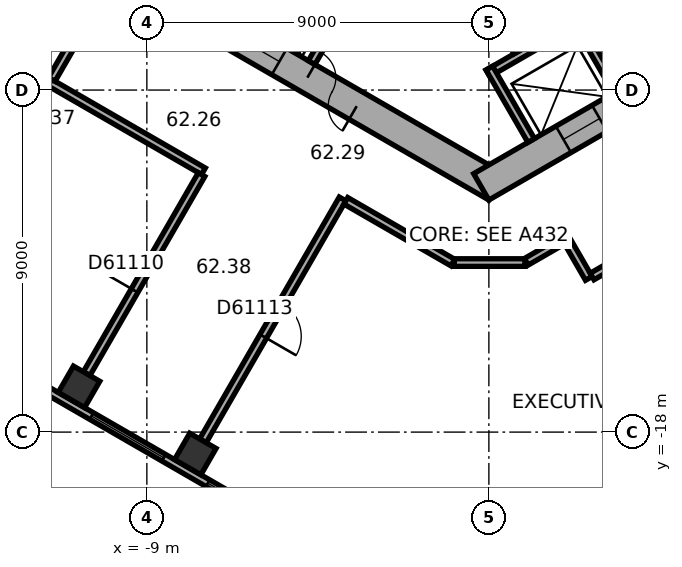
"""IFC4 building model, lengths in metres.
Left out: names, types, materials, properties, quantities, classifications, styles, units other than length and angle.
Written with IfcOpenShell. Run it as: python <this file> out.ifc"""

import sys

from ifc_helpers import new_model, si_unit, direction, frame, frame_2d, origin, origin_2d, place, context, subcontext, project, spatial, rectangle, extrude, element, fill, save


model = new_model("IFC4")
c1 = context("Model", 3, precision=1e-05, world=origin(), true_north=direction((0.0, 1.0)))
c2 = subcontext(c1, "Body", "Model", "MODEL_VIEW")
j1 = project(units=[si_unit("LENGTHUNIT", "METRE"), si_unit("PLANEANGLEUNIT", "RADIAN")], contexts=[c1])
p1 = place(None, origin())
s1 = spatial("IfcSite", under=j1, at=p1, CompositionType="ELEMENT")
p2 = place(p1, origin())
s2 = spatial("IfcBuilding", under=s1, at=p2, CompositionType="ELEMENT")
p3 = place(p2, frame((0.0, 0.0, 251.3)))
s3 = spatial("IfcBuildingStorey", under=s2, at=p3, CompositionType="ELEMENT", Elevation=251.3)
for number, where, z_axis, x_axis in (
    (1, (-10.785, -16.809, 0.0), (0.0, 0.0, 1.0), (0.866, -0.5, 0.0)),
    (2, (-7.725, -18.576, 0.0), (0.0, 0.0, 1.0), (0.866, -0.5, 0.0)),
):
    element("IfcColumn", number, at=place(p3, frame(where, z_axis=z_axis, x_axis=x_axis)), inside=s3, PredefinedType="COLUMN", context=c2, shape_type="SweptSolid", body=[
        extrude(rectangle(XDim=0.8, YDim=0.8, at=origin_2d()), origin(), (0.0, 0.0, 1.0), 3.7),
    ])
p4 = place(p3, frame((-10.1, -5.6, 0.0), z_axis=(0.0, 0.0, 1.0), x_axis=(0.866023897231, -0.500002609418, 0.0)))
e3 = element("IfcWall", 3, at=p4, inside=s3, PredefinedType="SHEAR", context=c2, shape_type="SweptSolid", body=[
    extrude(rectangle(XDim=11.894, YDim=0.8, at=frame_2d((5.947, 0.0))), origin(), (0.0, 0.0, 1.0), 3.7),
])
p5 = place(p4, frame((6.147, 0.0, 0.0)))
e4 = element("IfcOpeningElement", 4, at=p5, cuts=e3, PredefinedType="OPENING", context=c2, shape_type="SweptSolid", body=[
    extrude(rectangle(XDim=1.5, YDim=2.1, at=frame_2d((0.75, 1.05))), frame((0.0, 0.41, 0.0), z_axis=(0.0, -1.0, 0.0), x_axis=(1.0, 0.0, 0.0)), (0.0, 0.0, 1.0), 0.82),
])
p6 = place(p4, frame((1.597, 0.0, 0.0)))
e5 = element("IfcOpeningElement", 5, at=p6, cuts=e3, PredefinedType="OPENING", context=c2, shape_type="SweptSolid", body=[
    extrude(rectangle(XDim=1.1, YDim=2.1, at=frame_2d((0.55, 1.05))), frame((0.0, 0.41, 0.0), z_axis=(0.0, -1.0, 0.0), x_axis=(1.0, 0.0, 0.0)), (0.0, 0.0, 1.0), 0.82),
])
p7 = place(p4, frame((4.197, 0.0, 0.0)))
e6 = element("IfcOpeningElement", 6, at=p7, cuts=e3, PredefinedType="OPENING", context=c2, shape_type="SweptSolid", body=[
    extrude(rectangle(XDim=1.1, YDim=2.1, at=frame_2d((0.55, 1.05))), frame((0.0, 0.41, 0.0), z_axis=(0.0, -1.0, 0.0), x_axis=(1.0, 0.0, 0.0)), (0.0, 0.0, 1.0), 0.82),
])
p8 = place(p3, frame((-0.2, -11.547, 0.0), z_axis=(0.0, 0.0, 1.0), x_axis=(0.866023897231, 0.500002609418, 0.0)))
e7 = element("IfcWall", 7, at=p8, inside=s3, PredefinedType="SHEAR", context=c2, shape_type="SweptSolid", body=[
    extrude(rectangle(XDim=11.894, YDim=0.8, at=frame_2d((5.947, 0.0))), origin(), (0.0, 0.0, 1.0), 3.7),
])
p9 = place(p8, frame((2.497, 0.0, 0.0)))
e8 = element("IfcOpeningElement", 8, at=p9, cuts=e7, PredefinedType="OPENING", context=c2, shape_type="SweptSolid", body=[
    extrude(rectangle(XDim=1.1, YDim=2.1, at=frame_2d((0.55, 1.05))), frame((0.0, 0.41, 0.0), z_axis=(0.0, -1.0, 0.0), x_axis=(1.0, 0.0, 0.0)), (0.0, 0.0, 1.0), 0.82),
])
p10 = place(p8, frame((5.097, 0.0, 0.0)))
e9 = element("IfcOpeningElement", 9, at=p10, cuts=e7, PredefinedType="OPENING", context=c2, shape_type="SweptSolid", body=[
    extrude(rectangle(XDim=1.1, YDim=2.1, at=frame_2d((0.55, 1.05))), frame((0.0, 0.41, 0.0), z_axis=(0.0, -1.0, 0.0), x_axis=(1.0, 0.0, 0.0)), (0.0, 0.0, 1.0), 0.82),
])
p11 = place(p8, frame((7.697, 0.0, 0.0)))
e10 = element("IfcOpeningElement", 10, at=p11, cuts=e7, PredefinedType="OPENING", context=c2, shape_type="SweptSolid", body=[
    extrude(rectangle(XDim=1.1, YDim=2.1, at=frame_2d((0.55, 1.05))), frame((0.0, 0.41, 0.0), z_axis=(0.0, -1.0, 0.0), x_axis=(1.0, 0.0, 0.0)), (0.0, 0.0, 1.0), 0.82),
])
p12 = place(p3, frame((-17.664, -13.415, 0.0), z_axis=(0.0, 0.0, 1.0), x_axis=(0.866026555358, -0.49999800541, 0.0)))
e11 = element("IfcWall", 11, at=p12, inside=s3, PredefinedType="STANDARD", context=c2, shape_type="SweptSolid", body=[
    extrude(rectangle(XDim=18.841, YDim=0.2, at=frame_2d((9.421, 0.0))), origin(), (0.0, 0.0, 1.0), 3.7),
])
p13 = place(p12, frame((1.254, 0.0, 0.9)))
e12 = element("IfcOpeningElement", 12, at=p13, cuts=e11, PredefinedType="OPENING", context=c2, shape_type="SweptSolid", body=[
    extrude(rectangle(XDim=2.2, YDim=2.0, at=frame_2d((1.1, 1.0))), frame((0.0, 0.11, 0.0), z_axis=(0.0, -1.0, 0.0), x_axis=(1.0, 0.0, 0.0)), (0.0, 0.0, 1.0), 0.22),
])
p14 = place(p12, frame((4.788, 0.0, 0.9)))
e13 = element("IfcOpeningElement", 13, at=p14, cuts=e11, PredefinedType="OPENING", context=c2, shape_type="SweptSolid", body=[
    extrude(rectangle(XDim=2.2, YDim=2.0, at=frame_2d((1.1, 1.0))), frame((0.0, 0.11, 0.0), z_axis=(0.0, -1.0, 0.0), x_axis=(1.0, 0.0, 0.0)), (0.0, 0.0, 1.0), 0.22),
])
p15 = place(p12, frame((8.322, 0.0, 0.9)))
e14 = element("IfcOpeningElement", 14, at=p15, cuts=e11, PredefinedType="OPENING", context=c2, shape_type="SweptSolid", body=[
    extrude(rectangle(XDim=2.2, YDim=2.0, at=frame_2d((1.1, 1.0))), frame((0.0, 0.11, 0.0), z_axis=(0.0, -1.0, 0.0), x_axis=(1.0, 0.0, 0.0)), (0.0, 0.0, 1.0), 0.22),
])
p16 = place(p12, frame((11.855, 0.0, 0.9)))
e15 = element("IfcOpeningElement", 15, at=p16, cuts=e11, PredefinedType="OPENING", context=c2, shape_type="SweptSolid", body=[
    extrude(rectangle(XDim=2.2, YDim=2.0, at=frame_2d((1.1, 1.0))), frame((0.0, 0.11, 0.0), z_axis=(0.0, -1.0, 0.0), x_axis=(1.0, 0.0, 0.0)), (0.0, 0.0, 1.0), 0.22),
])
p17 = place(p12, frame((15.389, 0.0, 0.9)))
e16 = element("IfcOpeningElement", 16, at=p17, cuts=e11, PredefinedType="OPENING", context=c2, shape_type="SweptSolid", body=[
    extrude(rectangle(XDim=2.2, YDim=2.0, at=frame_2d((1.1, 1.0))), frame((0.0, 0.11, 0.0), z_axis=(0.0, -1.0, 0.0), x_axis=(1.0, 0.0, 0.0)), (0.0, 0.0, 1.0), 0.22),
])
p18 = place(p3, frame((2.739, -22.711, 0.0), z_axis=(0.0, 0.0, 1.0), x_axis=(0.833885723098, 0.551937134838, 0.0)))
e17 = element("IfcWall", 17, at=p18, inside=s3, PredefinedType="STANDARD", context=c2, shape_type="SweptSolid", body=[
    extrude(rectangle(XDim=18.841, YDim=0.2, at=frame_2d((9.421, 0.0))), origin(), (0.0, 0.0, 1.0), 3.7),
])
p19 = place(p18, frame((1.252, 0.0, 0.9)))
e18 = element("IfcOpeningElement", 18, at=p19, cuts=e17, PredefinedType="OPENING", context=c2, shape_type="SweptSolid", body=[
    extrude(rectangle(XDim=2.2, YDim=2.0, at=frame_2d((1.1, 1.0))), frame((0.0, 0.11, 0.0), z_axis=(0.0, -1.0, 0.0), x_axis=(1.0, 0.0, 0.0)), (0.0, 0.0, 1.0), 0.22),
])
p20 = place(p18, frame((4.786, 0.0, 0.9)))
e19 = element("IfcOpeningElement", 19, at=p20, cuts=e17, PredefinedType="OPENING", context=c2, shape_type="SweptSolid", body=[
    extrude(rectangle(XDim=2.2, YDim=2.0, at=frame_2d((1.1, 1.0))), frame((0.0, 0.11, 0.0), z_axis=(0.0, -1.0, 0.0), x_axis=(1.0, 0.0, 0.0)), (0.0, 0.0, 1.0), 0.22),
])
p21 = place(p18, frame((8.32, 0.0, 0.9)))
e20 = element("IfcOpeningElement", 20, at=p21, cuts=e17, PredefinedType="OPENING", context=c2, shape_type="SweptSolid", body=[
    extrude(rectangle(XDim=2.2, YDim=2.0, at=frame_2d((1.1, 1.0))), frame((0.0, 0.11, 0.0), z_axis=(0.0, -1.0, 0.0), x_axis=(1.0, 0.0, 0.0)), (0.0, 0.0, 1.0), 0.22),
])
p22 = place(p18, frame((11.854, 0.0, 0.9)))
e21 = element("IfcOpeningElement", 21, at=p22, cuts=e17, PredefinedType="OPENING", context=c2, shape_type="SweptSolid", body=[
    extrude(rectangle(XDim=2.2, YDim=2.0, at=frame_2d((1.1, 1.0))), frame((0.0, 0.11, 0.0), z_axis=(0.0, -1.0, 0.0), x_axis=(1.0, 0.0, 0.0)), (0.0, 0.0, 1.0), 0.22),
])
p23 = place(p18, frame((15.387, 0.0, 0.9)))
e22 = element("IfcOpeningElement", 22, at=p23, cuts=e17, PredefinedType="OPENING", context=c2, shape_type="SweptSolid", body=[
    extrude(rectangle(XDim=2.2, YDim=2.0, at=frame_2d((1.1, 1.0))), frame((0.0, 0.11, 0.0), z_axis=(0.0, -1.0, 0.0), x_axis=(1.0, 0.0, 0.0)), (0.0, 0.0, 1.0), 0.22),
])
p24 = place(p3, frame((-3.563, -6.372, 0.0), z_axis=(0.0, 0.0, 1.0), x_axis=(-0.499994660107, -0.866028486751, 0.0)))
e23 = element("IfcWall", 23, at=p24, inside=s3, PredefinedType="PARTITIONING", context=c2, shape_type="SweptSolid", body=[
    extrude(rectangle(XDim=2.2, YDim=0.2, at=frame_2d((1.1, 0.0))), origin(), (0.0, 0.0, 1.0), 3.35),
])
p25 = place(p3, frame((-0.024, -8.559, 0.0), z_axis=(0.0, 0.0, 1.0), x_axis=(0.866026010844, 0.49999894854, 0.0)))
e24 = element("IfcWall", 24, at=p25, inside=s3, PredefinedType="PARTITIONING", context=c2, shape_type="SweptSolid", body=[
    extrude(rectangle(XDim=8.0, YDim=0.2, at=frame_2d((4.0, 0.0))), origin(), (0.0, 0.0, 1.0), 3.35),
])
for number, where, z_axis, x_axis in (
    (25, (0.013, -8.422, 0.0), (0.0, 0.0, 1.0), (0.5, -0.866, 0.0)),
    (26, (2.264, -7.122, 0.0), (0.0, 0.0, 1.0), (0.5, -0.866, 0.0)),
):
    element("IfcWall", number, at=place(p3, frame(where, z_axis=z_axis, x_axis=x_axis)), inside=s3, PredefinedType="PARTITIONING", context=c2, shape_type="SweptSolid", body=[
        extrude(rectangle(XDim=2.2, YDim=0.2, at=frame_2d((1.1, 0.0))), origin(), (0.0, 0.0, 1.0), 3.35),
    ])
p26 = place(p3, frame((-1.558, -3.902, 0.0), z_axis=(0.0, 0.0, 1.0), x_axis=(0.499977259774, -0.866038532462, 0.0)))
e27 = element("IfcWall", 27, at=p26, inside=s3, PredefinedType="SHEAR", context=c2, shape_type="SweptSolid", body=[
    extrude(rectangle(XDim=4.7, YDim=0.3, at=frame_2d((2.35, 0.0))), origin(), (0.0, 0.0, 1.0), 3.35),
])
p27 = place(p26, frame((0.8, 0.0, 0.0)))
e28 = element("IfcOpeningElement", 28, at=p27, cuts=e27, PredefinedType="OPENING", context=c2, shape_type="SweptSolid", body=[
    extrude(rectangle(XDim=1.2, YDim=2.1, at=frame_2d((0.6, 1.05))), frame((0.0, 0.16, 0.0), z_axis=(0.0, -1.0, 0.0), x_axis=(1.0, 0.0, 0.0)), (0.0, 0.0, 1.0), 0.32),
])
p28 = place(p3, frame((-11.551, -8.805, 0.0), z_axis=(0.0, 0.0, 1.0), x_axis=(0.866038310922, -0.499977643516, 0.0)))
e29 = element("IfcWall", 29, at=p28, inside=s3, PredefinedType="PARTITIONING", context=c2, shape_type="SweptSolid", body=[
    extrude(rectangle(XDim=4.665, YDim=0.2, at=frame_2d((2.333, 0.0))), origin(), (0.0, 0.0, 1.0), 3.35),
])
p29 = place(p3, frame((-10.951, -7.765, 0.0), z_axis=(0.0, 0.0, 1.0), x_axis=(-0.499978356969, -0.866037899034, 0.0)))
e30 = element("IfcWall", 30, at=p29, inside=s3, PredefinedType="PARTITIONING", context=c2, shape_type="SweptSolid", body=[
    extrude(rectangle(XDim=1.101, YDim=0.2, at=frame_2d((0.551, 0.0))), origin(), (0.0, 0.0, 1.0), 3.35),
])
p30 = place(p3, frame((-10.585, -16.463, 0.0), z_axis=(0.0, 0.0, 1.0), x_axis=(0.499993802756, 0.866028981735, 0.0)))
e31 = element("IfcWall", 31, at=p30, inside=s3, PredefinedType="PARTITIONING", context=c2, shape_type="SweptSolid", body=[
    extrude(rectangle(XDim=6.049, YDim=0.2, at=frame_2d((3.024, 0.0))), origin(), (0.0, 0.0, 1.0), 2.65),
])
p31 = place(p30, frame((2.524, 0.0, 0.0)))
e32 = element("IfcOpeningElement", 32, at=p31, cuts=e31, PredefinedType="OPENING", context=c2, shape_type="SweptSolid", body=[
    extrude(rectangle(XDim=1.0, YDim=2.1, at=frame_2d((0.5, 1.05))), frame((0.0, 0.11, 0.0), z_axis=(0.0, -1.0, 0.0), x_axis=(1.0, 0.0, 0.0)), (0.0, 0.0, 1.0), 0.22),
])
p32 = place(p3, frame((-7.525, -18.23, 0.0), z_axis=(0.0, 0.0, 1.0), x_axis=(0.499983153418, 0.866035129944, 0.0)))
e33 = element("IfcWall", 33, at=p32, inside=s3, PredefinedType="PARTITIONING", context=c2, shape_type="SweptSolid", body=[
    extrude(rectangle(XDim=7.35, YDim=0.2, at=frame_2d((3.675, 0.0))), origin(), (0.0, 0.0, 1.0), 3.35),
])
p33 = place(p32, frame((3.175, 0.0, 0.0)))
e34 = element("IfcOpeningElement", 34, at=p33, cuts=e33, PredefinedType="OPENING", context=c2, shape_type="SweptSolid", body=[
    extrude(rectangle(XDim=1.0, YDim=2.1, at=frame_2d((0.5, 1.05))), frame((0.0, 0.11, 0.0), z_axis=(0.0, -1.0, 0.0), x_axis=(1.0, 0.0, 0.0)), (0.0, 0.0, 1.0), 0.22),
])
p34 = place(p3, frame((-3.763, -11.915, 0.0), z_axis=(0.0, 0.0, 1.0), x_axis=(0.866037915695, -0.499978328108, 0.0)))
e35 = element("IfcWall", 35, at=p34, inside=s3, PredefinedType="PARTITIONING", context=c2, shape_type="SweptSolid", body=[
    extrude(rectangle(XDim=3.249, YDim=0.2, at=frame_2d((1.625, 0.0))), origin(), (0.0, 0.0, 1.0), 3.35),
])
p35 = place(p3, frame((-0.91, -13.539, 0.0), z_axis=(0.0, 0.0, 1.0), x_axis=(1.0, 0.0, 0.0)))
e36 = element("IfcWall", 36, at=p35, inside=s3, PredefinedType="PARTITIONING", context=c2, shape_type="SweptSolid", body=[
    extrude(rectangle(XDim=1.86, YDim=0.2, at=frame_2d((0.93, 0.0))), origin(), (0.0, 0.0, 1.0), 3.35),
])
p36 = place(p3, frame((0.985, -13.519, 0.0), z_axis=(0.0, 0.0, 1.0), x_axis=(0.866054082991, 0.499950322867, 0.0)))
e37 = element("IfcWall", 37, at=p36, inside=s3, PredefinedType="PARTITIONING", context=c2, shape_type="SweptSolid", body=[
    extrude(rectangle(XDim=1.206, YDim=0.2, at=frame_2d((0.603, 0.0))), origin(), (0.0, 0.0, 1.0), 3.35),
])
p37 = place(p3, frame((2.079, -13.003, 0.0), z_axis=(0.0, 0.0, 1.0), x_axis=(0.500074377092, -0.865982457891, 0.0)))
e38 = element("IfcWall", 38, at=p37, inside=s3, PredefinedType="PARTITIONING", context=c2, shape_type="SweptSolid", body=[
    extrude(rectangle(XDim=1.101, YDim=0.2, at=frame_2d((0.55, 0.0))), origin(), (0.0, 0.0, 1.0), 3.35),
])
p38 = place(p3, frame((2.716, -13.906, 0.0), z_axis=(0.0, 0.0, 1.0), x_axis=(0.866048512801, 0.499959971872, 0.0)))
e39 = element("IfcWall", 39, at=p38, inside=s3, PredefinedType="PARTITIONING", context=c2, shape_type="SweptSolid", body=[
    extrude(rectangle(XDim=2.818, YDim=0.2, at=frame_2d((1.409, 0.0))), origin(), (0.0, 0.0, 1.0), 3.35),
])
p39 = place(p15, origin())
e40 = element("IfcWindow", 40, at=p39, inside=s3, PartitioningType="SINGLE_PANEL", PredefinedType="WINDOW", context=c2, shape_type="SweptSolid", body=[
    extrude(rectangle(XDim=2.2, YDim=2.0, at=frame_2d((1.1, 1.0))), frame((0.0, 0.03, 0.0), z_axis=(0.0, -1.0, 0.0), x_axis=(1.0, 0.0, 0.0)), (0.0, 0.0, 1.0), 0.06),
])
fill(e14, e40)
p40 = place(p16, origin())
e41 = element("IfcWindow", 41, at=p40, inside=s3, PartitioningType="SINGLE_PANEL", PredefinedType="WINDOW", context=c2, shape_type="SweptSolid", body=[
    extrude(rectangle(XDim=2.2, YDim=2.0, at=frame_2d((1.1, 1.0))), frame((0.0, 0.03, 0.0), z_axis=(0.0, -1.0, 0.0), x_axis=(1.0, 0.0, 0.0)), (0.0, 0.0, 1.0), 0.06),
])
fill(e15, e41)
p41 = place(p5, origin())
e42 = element("IfcDoor", 42, at=p41, inside=s3, OperationType="DOUBLE_DOOR_SINGLE_SWING", PredefinedType="DOOR", context=c2, shape_type="SweptSolid", body=[
    extrude(rectangle(XDim=1.5, YDim=2.1, at=frame_2d((0.75, 1.05))), frame((0.0, 0.025, 0.0), z_axis=(0.0, -1.0, 0.0), x_axis=(1.0, 0.0, 0.0)), (0.0, 0.0, 1.0), 0.05),
])
fill(e4, e42)
p42 = place(p7, origin())
e43 = element("IfcDoor", 43, at=p42, inside=s3, OperationType="DOUBLE_DOOR_SLIDING", PredefinedType="DOOR", context=c2, shape_type="SweptSolid", body=[
    extrude(rectangle(XDim=1.1, YDim=2.1, at=frame_2d((0.55, 1.05))), frame((0.0, 0.025, 0.0), z_axis=(0.0, -1.0, 0.0), x_axis=(1.0, 0.0, 0.0)), (0.0, 0.0, 1.0), 0.05),
])
fill(e6, e43)
p43 = place(p9, origin())
e44 = element("IfcDoor", 44, at=p43, inside=s3, OperationType="DOUBLE_DOOR_SLIDING", PredefinedType="DOOR", context=c2, shape_type="SweptSolid", body=[
    extrude(rectangle(XDim=1.1, YDim=2.1, at=frame_2d((0.55, 1.05))), frame((0.0, 0.025, 0.0), z_axis=(0.0, -1.0, 0.0), x_axis=(1.0, 0.0, 0.0)), (0.0, 0.0, 1.0), 0.05),
])
fill(e8, e44)
p44 = place(p31, origin())
e45 = element("IfcDoor", 45, at=p44, inside=s3, OperationType="SINGLE_SWING_LEFT", PredefinedType="DOOR", context=c2, shape_type="SweptSolid", body=[
    extrude(rectangle(XDim=1.0, YDim=2.1, at=frame_2d((0.5, 1.05))), frame((0.0, 0.025, 0.0), z_axis=(0.0, -1.0, 0.0), x_axis=(1.0, 0.0, 0.0)), (0.0, 0.0, 1.0), 0.05),
])
fill(e32, e45)
p45 = place(p33, origin())
e46 = element("IfcDoor", 46, at=p45, inside=s3, OperationType="SINGLE_SWING_LEFT", PredefinedType="DOOR", context=c2, shape_type="SweptSolid", body=[
    extrude(rectangle(XDim=1.0, YDim=2.1, at=frame_2d((0.5, 1.05))), frame((0.0, 0.025, 0.0), z_axis=(0.0, -1.0, 0.0), x_axis=(1.0, 0.0, 0.0)), (0.0, 0.0, 1.0), 0.05),
])
fill(e34, e46)
save(model, sys.argv[1])
